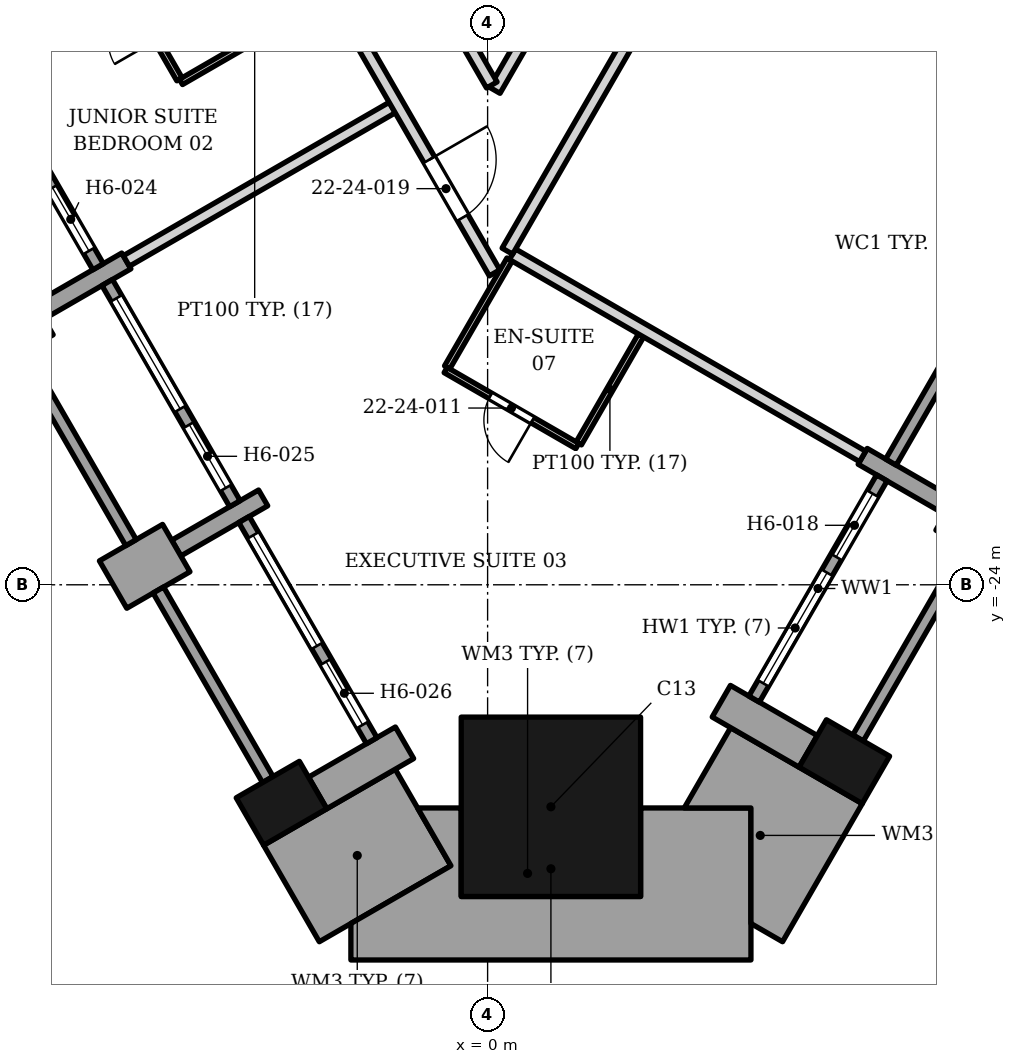
"""IFC4 building model, lengths in metres.
Left out: names, types, materials, properties, quantities, classifications, styles, units other than length and angle.
Written with IfcOpenShell. Run it as: python <this file> out.ifc"""

import sys

from ifc_helpers import new_model, si_unit, direction, frame, frame_2d, origin, origin_2d, place, context, subcontext, project, spatial, polyline, rectangle, outline, extrude, element, fill, save


model = new_model("IFC4")
c1 = context("Model", 3, precision=1e-05, world=origin(), true_north=direction((0.0, 1.0)))
c2 = subcontext(c1, "Body", "Model", "MODEL_VIEW")
j1 = project(units=[si_unit("LENGTHUNIT", "METRE"), si_unit("PLANEANGLEUNIT", "RADIAN")], contexts=[c1])
p1 = place(None, origin())
s1 = spatial("IfcSite", under=j1, at=p1, CompositionType="ELEMENT")
p2 = place(p1, origin())
s2 = spatial("IfcBuilding", under=s1, at=p2, CompositionType="ELEMENT")
p3 = place(p2, frame((0.0, 0.0, 102.0)))
s3 = spatial("IfcBuildingStorey", under=s2, at=p3, CompositionType="ELEMENT", Elevation=102.0)
p4 = place(p3, frame((1.041, -27.651, 0.0), z_axis=(0.0, 0.0, 1.0), x_axis=(0.0, 1.0, 0.0)))
e1 = element("IfcColumn", 1, at=p4, inside=s3, PredefinedType="COLUMN", context=c2, shape_type="SweptSolid", body=[
    extrude(rectangle(XDim=2.95, YDim=2.95, at=origin_2d()), origin(), (0.0, 0.0, 1.0), 3.4),
])
for number, where, z_axis, x_axis in (
    (2, (-7.89, -19.799, 0.0), (0.0, 0.0, 1.0), (0.5, -0.866, 0.0)),
    (3, (-3.39, -27.593, 0.0), (0.0, 0.0, 1.0), (0.5, -0.866, 0.0)),
    (4, (5.867, -26.909, 0.0), (0.0, 0.0, 1.0), (0.5, 0.866, 0.0)),
):
    element("IfcColumn", number, at=place(p3, frame(where, z_axis=z_axis, x_axis=x_axis)), inside=s3, PredefinedType="COLUMN", context=c2, shape_type="SweptSolid", body=[
        extrude(rectangle(XDim=0.9, YDim=1.2, at=origin_2d()), origin(), (0.0, 0.0, 1.0), 3.4),
    ])
p5 = place(p3, frame((-7.37, -19.499, 0.0), z_axis=(0.0, 0.0, 1.0), x_axis=(0.866040211805, 0.499974350878, 0.0)))
e5 = element("IfcWall", 5, at=p5, inside=s3, PredefinedType="SOLIDWALL", context=c2, shape_type="SweptSolid", body=[
    extrude(rectangle(XDim=1.65, YDim=0.3, at=frame_2d((0.825, 0.0))), origin(), (0.0, 0.0, 1.0), 2.65),
])
p6 = place(p3, frame((-6.159, -23.996, 0.0), z_axis=(0.0, 0.0, 1.0), x_axis=(0.865955154139, 0.50012165622, 0.0)))
e6 = element("IfcWall", 6, at=p6, inside=s3, PredefinedType="SOLIDWALL", context=c2, shape_type="SweptSolid", body=[
    extrude(rectangle(XDim=1.2, YDim=0.9, at=frame_2d((0.6, 0.0))), origin(), (0.0, 0.0, 1.0), 2.63),
])
p7 = place(p3, frame((-3.691, -22.571, 0.0), z_axis=(0.0, 0.0, 1.0), x_axis=(-0.866040211805, -0.499974350878, 0.0)))
e7 = element("IfcWall", 7, at=p7, inside=s3, PredefinedType="SOLIDWALL", context=c2, shape_type="SweptSolid", body=[
    extrude(rectangle(XDim=1.65, YDim=0.3, at=frame_2d((0.825, 0.0))), origin(), (0.0, 0.0, 1.0), 2.628),
])
p8 = place(p3, frame((-2.795, -27.423, 0.0), z_axis=(0.0, 0.0, 1.0), x_axis=(0.866040211805, 0.499974350878, 0.0)))
e8 = element("IfcWall", 8, at=p8, inside=s3, PredefinedType="SOLIDWALL", context=c2, shape_type="SweptSolid", body=[
    extrude(rectangle(XDim=1.65, YDim=0.6, at=frame_2d((0.825, 0.0))), origin(), (0.0, 0.0, 1.0), 2.63),
])
p9 = place(p3, frame((-8.506, -15.132, 0.0), z_axis=(0.0, 0.0, 1.0), x_axis=(0.500027713859, -0.866009402589, 0.0)))
e9 = element("IfcWall", 9, at=p9, inside=s3, PredefinedType="ELEMENTEDWALL", context=c2, shape_type="SweptSolid", body=[
    extrude(rectangle(XDim=4.2, YDim=0.2, at=frame_2d((2.1, 0.0))), origin(), (0.0, 0.0, 1.0), 2.65),
])
p10 = place(p9, frame((0.3, 0.0, 0.6)))
e10 = element("IfcOpeningElement", 10, at=p10, cuts=e9, PredefinedType="OPENING", context=c2, shape_type="SweptSolid", body=[
    extrude(rectangle(XDim=2.1, YDim=1.8, at=frame_2d((1.05, 0.9))), frame((0.0, 0.11, 0.0), z_axis=(0.0, -1.0, 0.0), x_axis=(1.0, 0.0, 0.0)), (0.0, 0.0, 1.0), 0.22),
])
p11 = place(p9, frame((2.7, 0.0, 0.0)))
e11 = element("IfcOpeningElement", 11, at=p11, cuts=e9, PredefinedType="OPENING", context=c2, shape_type="SweptSolid", body=[
    extrude(rectangle(XDim=1.2, YDim=2.4, at=frame_2d((0.6, 1.2))), frame((0.0, 0.11, 0.0), z_axis=(0.0, -1.0, 0.0), x_axis=(1.0, 0.0, 0.0)), (0.0, 0.0, 1.0), 0.22),
])
p12 = place(p3, frame((-7.665, -20.189, 0.0), z_axis=(0.0, 0.0, 1.0), x_axis=(0.499961193289, -0.866047807691, 0.0)))
e12 = element("IfcWall", 12, at=p12, inside=s3, PredefinedType="SOLIDWALL", context=c2, shape_type="SweptSolid", body=[
    extrude(rectangle(XDim=3.6, YDim=0.2, at=frame_2d((1.8, 0.0))), origin(), (0.0, 0.0, 1.0), 2.63),
])
p13 = place(p3, frame((-6.256, -19.029, 0.0), z_axis=(0.0, 0.0, 1.0), x_axis=(0.500002543286, -0.866023935413, 0.0)))
e13 = element("IfcWall", 13, at=p13, inside=s3, PredefinedType="ELEMENTEDWALL", context=c2, shape_type="SweptSolid", body=[
    extrude(rectangle(XDim=4.2, YDim=0.2, at=frame_2d((2.1, 0.0))), origin(), (0.0, 0.0, 1.0), 2.628),
])
p14 = place(p13, frame((0.3, 0.0, 0.6)))
e14 = element("IfcOpeningElement", 14, at=p14, cuts=e13, PredefinedType="OPENING", context=c2, shape_type="SweptSolid", body=[
    extrude(rectangle(XDim=2.1, YDim=1.8, at=frame_2d((1.05, 0.9))), frame((0.0, 0.11, 0.0), z_axis=(0.0, -1.0, 0.0), x_axis=(1.0, 0.0, 0.0)), (0.0, 0.0, 1.0), 0.22),
])
p15 = place(p13, frame((2.7, 0.0, 0.0)))
e15 = element("IfcOpeningElement", 15, at=p15, cuts=e13, PredefinedType="OPENING", context=c2, shape_type="SweptSolid", body=[
    extrude(rectangle(XDim=1.2, YDim=2.4, at=frame_2d((0.6, 1.2))), frame((0.0, 0.11, 0.0), z_axis=(0.0, -1.0, 0.0), x_axis=(1.0, 0.0, 0.0)), (0.0, 0.0, 1.0), 0.22),
])
p16 = place(p3, frame((-5.415, -24.086, 0.0), z_axis=(0.0, 0.0, 1.0), x_axis=(0.499961193289, -0.866047807691, 0.0)))
e16 = element("IfcWall", 16, at=p16, inside=s3, PredefinedType="SOLIDWALL", context=c2, shape_type="SweptSolid", body=[
    extrude(rectangle(XDim=3.6, YDim=0.2, at=frame_2d((1.8, 0.0))), origin(), (0.0, 0.0, 1.0), 2.63),
])
p17 = place(p3, frame((-4.006, -22.926, 0.0), z_axis=(0.0, 0.0, 1.0), x_axis=(0.500027713859, -0.866009402589, 0.0)))
e17 = element("IfcWall", 17, at=p17, inside=s3, PredefinedType="ELEMENTEDWALL", context=c2, shape_type="SweptSolid", body=[
    extrude(rectangle(XDim=4.2, YDim=0.2, at=frame_2d((2.1, 0.0))), origin(), (0.0, 0.0, 1.0), 2.65),
])
p18 = place(p17, frame((0.3, 0.0, 0.6)))
e18 = element("IfcOpeningElement", 18, at=p18, cuts=e17, PredefinedType="OPENING", context=c2, shape_type="SweptSolid", body=[
    extrude(rectangle(XDim=2.1, YDim=1.8, at=frame_2d((1.05, 0.9))), frame((0.0, 0.11, 0.0), z_axis=(0.0, -1.0, 0.0), x_axis=(1.0, 0.0, 0.0)), (0.0, 0.0, 1.0), 0.22),
])
p19 = place(p17, frame((2.7, 0.0, 0.0)))
e19 = element("IfcOpeningElement", 19, at=p19, cuts=e17, PredefinedType="OPENING", context=c2, shape_type="SweptSolid", body=[
    extrude(rectangle(XDim=1.2, YDim=2.4, at=frame_2d((0.6, 1.2))), frame((0.0, 0.11, 0.0), z_axis=(0.0, -1.0, 0.0), x_axis=(1.0, 0.0, 0.0)), (0.0, 0.0, 1.0), 0.22),
])
p20 = place(p3, frame((5.272, -26.74, 0.0), z_axis=(0.0, 0.0, 1.0), x_axis=(-0.865976140824, 0.500085316245, 0.0)))
e20 = element("IfcWall", 20, at=p20, inside=s3, PredefinedType="SOLIDWALL", context=c2, shape_type="SweptSolid", body=[
    extrude(rectangle(XDim=1.65, YDim=0.6, at=frame_2d((0.825, 0.0))), origin(), (0.0, 0.0, 1.0), 2.552),
])
p21 = place(p3, frame((7.598, -22.712, 0.0), z_axis=(0.0, 0.0, 1.0), x_axis=(0.866043267704, -0.499969057507, 0.0)))
e21 = element("IfcWall", 21, at=p21, inside=s3, PredefinedType="SOLIDWALL", context=c2, shape_type="SweptSolid", body=[
    extrude(rectangle(XDim=1.2, YDim=0.9, at=frame_2d((0.6, 0.0))), origin(), (0.0, 0.0, 1.0), 2.63),
])
p22 = place(p3, frame((7.598, -22.712, 0.0), z_axis=(0.0, 0.0, 1.0), x_axis=(-0.866040211805, 0.499974350878, 0.0)))
e22 = element("IfcWall", 22, at=p22, inside=s3, PredefinedType="SOLIDWALL", context=c2, shape_type="SweptSolid", body=[
    extrude(rectangle(XDim=1.65, YDim=0.3, at=frame_2d((0.825, 0.0))), origin(), (0.0, 0.0, 1.0), 2.65),
])
p23 = place(p3, frame((6.092, -26.52, 0.0), z_axis=(0.0, 0.0, 1.0), x_axis=(0.500012057535, 0.866018442252, 0.0)))
e23 = element("IfcWall", 23, at=p23, inside=s3, PredefinedType="SOLIDWALL", context=c2, shape_type="SweptSolid", body=[
    extrude(rectangle(XDim=3.6, YDim=0.2, at=frame_2d((1.8, 0.0))), origin(), (0.0, 0.0, 1.0), 2.63),
])
p24 = place(p3, frame((4.383, -25.88, 0.0), z_axis=(0.0, 0.0, 1.0), x_axis=(0.500002543286, 0.866023935413, 0.0)))
e24 = element("IfcWall", 24, at=p24, inside=s3, PredefinedType="ELEMENTEDWALL", context=c2, shape_type="SweptSolid", body=[
    extrude(rectangle(XDim=4.2, YDim=0.2, at=frame_2d((2.1, 0.0))), origin(), (0.0, 0.0, 1.0), 2.552),
])
p25 = place(p24, frame((0.3, 0.0, 0.6)))
e25 = element("IfcOpeningElement", 25, at=p25, cuts=e24, PredefinedType="OPENING", context=c2, shape_type="SweptSolid", body=[
    extrude(rectangle(XDim=2.1, YDim=1.8, at=frame_2d((1.05, 0.9))), frame((0.0, 0.11, 0.0), z_axis=(0.0, -1.0, 0.0), x_axis=(1.0, 0.0, 0.0)), (0.0, 0.0, 1.0), 0.22),
])
p26 = place(p24, frame((2.7, 0.0, 0.0)))
e26 = element("IfcOpeningElement", 26, at=p26, cuts=e24, PredefinedType="OPENING", context=c2, shape_type="SweptSolid", body=[
    extrude(rectangle(XDim=1.2, YDim=2.4, at=frame_2d((0.6, 1.2))), frame((0.0, 0.11, 0.0), z_axis=(0.0, -1.0, 0.0), x_axis=(1.0, 0.0, 0.0)), (0.0, 0.0, 1.0), 0.22),
])
p27 = place(p3, frame((6.633, -21.982, 0.0), z_axis=(0.0, 0.0, 1.0), x_axis=(0.500027713859, 0.866009402589, 0.0)))
e27 = element("IfcWall", 27, at=p27, inside=s3, PredefinedType="ELEMENTEDWALL", context=c2, shape_type="SweptSolid", body=[
    extrude(rectangle(XDim=4.2, YDim=0.2, at=frame_2d((2.1, 0.0))), origin(), (0.0, 0.0, 1.0), 2.65),
])
p28 = place(p3, origin())
e28 = element("IfcWall", 28, at=p28, inside=s3, PredefinedType="SOLIDWALL", context=c2, shape_type="SweptSolid", body=[
    extrude(outline(polyline([(-0.603, -28.62), (-1.52, -27.033), (-3.685, -28.283), (-2.768, -29.87), (-0.603, -28.62)])), origin(), (0.0, 0.0, 1.0), 2.63),
])
p29 = place(p3, origin())
e29 = element("IfcWall", 29, at=p29, inside=s3, PredefinedType="SOLIDWALL", context=c2, shape_type="SweptSolid", body=[
    extrude(outline(polyline([(-0.434, -27.67), (-1.152, -27.67), (-0.603, -28.62), (-2.249, -29.57), (-2.249, -30.17), (4.331, -30.17), (4.331, -27.67), (2.516, -27.67), (2.516, -29.126), (-0.434, -29.126), (-0.434, -27.67)])), origin(), (0.0, 0.0, 1.0), 2.63),
])
p30 = place(p3, origin())
e30 = element("IfcWall", 30, at=p30, inside=s3, PredefinedType="SOLIDWALL", context=c2, shape_type="SweptSolid", body=[
    extrude(outline(polyline([(6.162, -27.599), (3.997, -26.349), (3.234, -27.67), (4.331, -27.67), (4.331, -29.57), (4.851, -29.87), (6.162, -27.599)])), origin(), (0.0, 0.0, 1.0), 2.552),
])
p31 = place(p3, frame((1.5, -21.675, 0.0), z_axis=(0.0, 0.0, 1.0), x_axis=(0.499303169309, 0.866427345551, 0.0)))
e31 = element("IfcWall", 31, at=p31, inside=s3, PredefinedType="PARTITIONING", context=c2, shape_type="SweptSolid", body=[
    extrude(rectangle(XDim=2.05, YDim=0.1, at=frame_2d((1.025, 0.0))), origin(), (0.0, 0.0, 1.0), 3.23),
])
p32 = place(p3, frame((-0.69, -20.468, 0.0), z_axis=(0.0, 0.0, 1.0), x_axis=(0.866022959057, -0.500004234368, 0.0)))
e32 = element("IfcWall", 32, at=p32, inside=s3, PredefinedType="PARTITIONING", context=c2, shape_type="SweptSolid", body=[
    extrude(rectangle(XDim=2.5, YDim=0.1, at=frame_2d((1.25, 0.0))), origin(), (0.0, 0.0, 1.0), 2.552),
])
p33 = place(p32, frame((0.85, 0.0, 0.0)))
e33 = element("IfcOpeningElement", 33, at=p33, cuts=e32, PredefinedType="OPENING", context=c2, shape_type="SweptSolid", body=[
    extrude(rectangle(XDim=0.8, YDim=2.1, at=frame_2d((0.4, 1.05))), frame((0.0, 0.06, 0.0), z_axis=(0.0, -1.0, 0.0), x_axis=(1.0, 0.0, 0.0)), (0.0, 0.0, 1.0), 0.12),
])
p34 = place(p3, frame((-5.941, -18.675, 0.0), z_axis=(0.0, 0.0, 1.0), x_axis=(0.866176731722, 0.499737800674, 0.0)))
e34 = element("IfcWall", 34, at=p34, inside=s3, PredefinedType="PARTITIONING", context=c2, shape_type="SweptSolid", body=[
    extrude(rectangle(XDim=5.05, YDim=0.2, at=frame_2d((2.525, 0.0))), origin(), (0.0, 0.0, 1.0), 2.628),
])
p35 = place(p3, frame((-0.665, -20.425, 0.0), z_axis=(0.0, 0.0, 1.0), x_axis=(0.500646589026, 0.865651773461, 0.0)))
e35 = element("IfcWall", 35, at=p35, inside=s3, PredefinedType="PARTITIONING", context=c2, shape_type="SweptSolid", body=[
    extrude(rectangle(XDim=2.05, YDim=0.1, at=frame_2d((1.025, 0.0))), origin(), (0.0, 0.0, 1.0), 2.552),
])
p36 = place(p3, frame((0.409, -18.564, 0.0), z_axis=(0.0, 0.0, 1.0), x_axis=(0.866008881804, -0.500028615818, 0.0)))
e36 = element("IfcWall", 36, at=p36, inside=s3, PredefinedType="PARTITIONING", context=c2, shape_type="SweptSolid", body=[
    extrude(rectangle(XDim=6.649, YDim=0.2, at=frame_2d((3.325, 0.0))), origin(), (0.0, 0.0, 1.0), 2.552),
])
p37 = place(p3, frame((0.117, -15.868, 0.0), z_axis=(0.0, 0.0, 1.0), x_axis=(0.500006185809, 0.866021832376, 0.0)))
e37 = element("IfcWall", 37, at=p37, inside=s3, PredefinedType="PARTITIONING", context=c2, shape_type="SweptSolid", body=[
    extrude(rectangle(XDim=8.168, YDim=0.2, at=frame_2d((4.084, 0.0))), origin(), (0.0, 0.0, 1.0), 2.302),
])
p38 = place(p37, frame((3.458, 0.0, 0.0)))
e38 = element("IfcOpeningElement", 38, at=p38, cuts=e37, PredefinedType="OPENING", context=c2, shape_type="SweptSolid", body=[
    extrude(rectangle(XDim=0.9, YDim=2.1, at=frame_2d((0.45, 1.05))), frame((0.0, 0.11, 0.0), z_axis=(0.0, -1.0, 0.0), x_axis=(1.0, 0.0, 0.0)), (0.0, 0.0, 1.0), 0.22),
])
p39 = place(p3, frame((-5.043, -15.731, 0.0), z_axis=(0.0, 0.0, 1.0), x_axis=(0.865682875764, 0.500592807188, 0.0)))
e39 = element("IfcWall", 39, at=p39, inside=s3, PredefinedType="PARTITIONING", context=c2, shape_type="SweptSolid", body=[
    extrude(rectangle(XDim=2.8, YDim=0.1, at=frame_2d((1.4, 0.0))), origin(), (0.0, 0.0, 1.0), 2.628),
])
p40 = place(p3, frame((-6.215, -13.696, 0.0), z_axis=(0.0, 0.0, 1.0), x_axis=(0.499418922955, -0.86636062895, 0.0)))
e40 = element("IfcWall", 40, at=p40, inside=s3, PredefinedType="PARTITIONING", context=c2, shape_type="SweptSolid", body=[
    extrude(rectangle(XDim=2.298, YDim=0.1, at=frame_2d((1.149, 0.0))), origin(), (0.0, 0.0, 1.0), 3.23),
])
p41 = place(p40, frame((0.748, 0.0, 0.0)))
e41 = element("IfcOpeningElement", 41, at=p41, cuts=e40, PredefinedType="OPENING", context=c2, shape_type="SweptSolid", body=[
    extrude(rectangle(XDim=0.8, YDim=2.1, at=frame_2d((0.4, 1.05))), frame((0.0, 0.06, 0.0), z_axis=(0.0, -1.0, 0.0), x_axis=(1.0, 0.0, 0.0)), (0.0, 0.0, 1.0), 0.12),
])
p42 = place(p3, frame((-3.965, -8.793, 0.0), z_axis=(0.0, 0.0, 1.0), x_axis=(0.499992237426, -0.866029885462, 0.0)))
e42 = element("IfcWall", 42, at=p42, inside=s3, PredefinedType="PARTITIONING", context=c2, shape_type="SweptSolid", body=[
    extrude(rectangle(XDim=8.069, YDim=0.2, at=frame_2d((4.034, 0.0))), origin(), (0.0, 0.0, 1.0), 2.45),
])
p43 = place(p42, frame((1.928, 0.0, 0.0)))
e43 = element("IfcOpeningElement", 43, at=p43, cuts=e42, PredefinedType="OPENING", context=c2, shape_type="SweptSolid", body=[
    extrude(rectangle(XDim=0.9, YDim=2.1, at=frame_2d((0.45, 1.05))), frame((0.0, 0.11, 0.0), z_axis=(0.0, -1.0, 0.0), x_axis=(1.0, 0.0, 0.0)), (0.0, 0.0, 1.0), 0.22),
])
p44 = place(p3, frame((0.325, -18.513, 0.0), z_axis=(0.0, 0.0, 1.0), x_axis=(0.499996012009, 0.86602770624, 0.0)))
e44 = element("IfcWall", 44, at=p44, inside=s3, PredefinedType="PARTITIONING", context=c2, shape_type="SweptSolid", body=[
    extrude(rectangle(XDim=18.0, YDim=0.2, at=frame_2d((9.0, 0.0))), origin(), (0.0, 0.0, 1.0), 2.302),
])
p45 = place(p44, frame((8.2, 0.0, 0.0)))
e45 = element("IfcOpeningElement", 45, at=p45, cuts=e44, PredefinedType="OPENING", context=c2, shape_type="SweptSolid", body=[
    extrude(rectangle(XDim=1.6, YDim=2.1, at=frame_2d((0.8, 1.05))), frame((0.0, 0.11, 0.0), z_axis=(0.0, -1.0, 0.0), x_axis=(1.0, 0.0, 0.0)), (0.0, 0.0, 1.0), 0.22),
])
p46 = place(p3, frame((-12.913, 3.699, 0.0), z_axis=(0.0, 0.0, 1.0), x_axis=(0.499907630167, -0.866078726964, 0.0)))
e46 = element("IfcWall", 46, at=p46, inside=s3, PredefinedType="PARTITIONING", context=c2, shape_type="SweptSolid", body=[
    extrude(rectangle(XDim=26.06, YDim=0.2, at=frame_2d((13.03, 0.0))), origin(), (0.0, 0.0, 1.0), 2.384),
])
p47 = place(p46, frame((6.312, 0.0, 0.0)))
e47 = element("IfcOpeningElement", 47, at=p47, cuts=e46, PredefinedType="OPENING", context=c2, shape_type="SweptSolid", body=[
    extrude(rectangle(XDim=1.6, YDim=2.1, at=frame_2d((0.8, 1.05))), frame((0.0, 0.11, 0.0), z_axis=(0.0, -1.0, 0.0), x_axis=(1.0, 0.0, 0.0)), (0.0, 0.0, 1.0), 0.22),
])
p48 = place(p46, frame((14.662, 0.0, 0.0)))
e48 = element("IfcOpeningElement", 48, at=p48, cuts=e46, PredefinedType="OPENING", context=c2, shape_type="SweptSolid", body=[
    extrude(rectangle(XDim=1.1, YDim=2.1, at=frame_2d((0.55, 1.05))), frame((0.0, 0.11, 0.0), z_axis=(0.0, -1.0, 0.0), x_axis=(1.0, 0.0, 0.0)), (0.0, 0.0, 1.0), 0.22),
])
p49 = place(p46, frame((23.911, 0.0, 0.0)))
e49 = element("IfcOpeningElement", 49, at=p49, cuts=e46, PredefinedType="OPENING", context=c2, shape_type="SweptSolid", body=[
    extrude(rectangle(XDim=1.1, YDim=2.1, at=frame_2d((0.55, 1.05))), frame((0.0, 0.11, 0.0), z_axis=(0.0, -1.0, 0.0), x_axis=(1.0, 0.0, 0.0)), (0.0, 0.0, 1.0), 0.22),
])
p50 = place(p11, origin())
e50 = element("IfcDoor", 50, at=p50, inside=s3, OperationType="SINGLE_SWING_LEFT", PredefinedType="DOOR", context=c2, shape_type="SweptSolid", body=[
    extrude(rectangle(XDim=1.2, YDim=2.4, at=frame_2d((0.6, 1.2))), frame((0.0, 0.025, 0.0), z_axis=(0.0, -1.0, 0.0), x_axis=(1.0, 0.0, 0.0)), (0.0, 0.0, 1.0), 0.05),
])
fill(e11, e50)
p51 = place(p14, origin())
e51 = element("IfcWindow", 51, at=p51, inside=s3, PartitioningType="SINGLE_PANEL", PredefinedType="WINDOW", context=c2, shape_type="SweptSolid", body=[
    extrude(rectangle(XDim=2.1, YDim=1.8, at=frame_2d((1.05, 0.9))), frame((0.0, 0.03, 0.0), z_axis=(0.0, -1.0, 0.0), x_axis=(1.0, 0.0, 0.0)), (0.0, 0.0, 1.0), 0.06),
])
fill(e14, e51)
p52 = place(p15, origin())
e52 = element("IfcDoor", 52, at=p52, inside=s3, OperationType="SINGLE_SWING_LEFT", PredefinedType="DOOR", context=c2, shape_type="SweptSolid", body=[
    extrude(rectangle(XDim=1.2, YDim=2.4, at=frame_2d((0.6, 1.2))), frame((0.0, 0.025, 0.0), z_axis=(0.0, -1.0, 0.0), x_axis=(1.0, 0.0, 0.0)), (0.0, 0.0, 1.0), 0.05),
])
fill(e15, e52)
p53 = place(p18, origin())
e53 = element("IfcWindow", 53, at=p53, inside=s3, PartitioningType="SINGLE_PANEL", PredefinedType="WINDOW", context=c2, shape_type="SweptSolid", body=[
    extrude(rectangle(XDim=2.1, YDim=1.8, at=frame_2d((1.05, 0.9))), frame((0.0, 0.03, 0.0), z_axis=(0.0, -1.0, 0.0), x_axis=(1.0, 0.0, 0.0)), (0.0, 0.0, 1.0), 0.06),
])
fill(e18, e53)
p54 = place(p19, origin())
e54 = element("IfcDoor", 54, at=p54, inside=s3, OperationType="SINGLE_SWING_LEFT", PredefinedType="DOOR", context=c2, shape_type="SweptSolid", body=[
    extrude(rectangle(XDim=1.2, YDim=2.4, at=frame_2d((0.6, 1.2))), frame((0.0, 0.025, 0.0), z_axis=(0.0, -1.0, 0.0), x_axis=(1.0, 0.0, 0.0)), (0.0, 0.0, 1.0), 0.05),
])
fill(e19, e54)
p55 = place(p25, origin())
e55 = element("IfcWindow", 55, at=p55, inside=s3, PartitioningType="SINGLE_PANEL", PredefinedType="WINDOW", context=c2, shape_type="SweptSolid", body=[
    extrude(rectangle(XDim=2.1, YDim=1.8, at=frame_2d((1.05, 0.9))), frame((0.0, 0.03, 0.0), z_axis=(0.0, -1.0, 0.0), x_axis=(1.0, 0.0, 0.0)), (0.0, 0.0, 1.0), 0.06),
])
fill(e25, e55)
p56 = place(p26, origin())
e56 = element("IfcDoor", 56, at=p56, inside=s3, OperationType="SINGLE_SWING_LEFT", PredefinedType="DOOR", context=c2, shape_type="SweptSolid", body=[
    extrude(rectangle(XDim=1.2, YDim=2.4, at=frame_2d((0.6, 1.2))), frame((0.0, 0.025, 0.0), z_axis=(0.0, -1.0, 0.0), x_axis=(1.0, 0.0, 0.0)), (0.0, 0.0, 1.0), 0.05),
])
fill(e26, e56)
p57 = place(p33, origin())
e57 = element("IfcDoor", 57, at=p57, inside=s3, OperationType="SINGLE_SWING_RIGHT", PredefinedType="DOOR", context=c2, shape_type="SweptSolid", body=[
    extrude(rectangle(XDim=0.8, YDim=2.1, at=frame_2d((0.4, 1.05))), frame((0.0, 0.025, 0.0), z_axis=(0.0, -1.0, 0.0), x_axis=(1.0, 0.0, 0.0)), (0.0, 0.0, 1.0), 0.05),
])
fill(e33, e57)
p58 = place(p49, origin())
e58 = element("IfcDoor", 58, at=p58, inside=s3, OperationType="SINGLE_SWING_LEFT", PredefinedType="DOOR", context=c2, shape_type="SweptSolid", body=[
    extrude(rectangle(XDim=1.1, YDim=2.1, at=frame_2d((0.55, 1.05))), frame((0.0, 0.025, 0.0), z_axis=(0.0, -1.0, 0.0), x_axis=(1.0, 0.0, 0.0)), (0.0, 0.0, 1.0), 0.05),
])
fill(e49, e58)
save(model, sys.argv[1])
